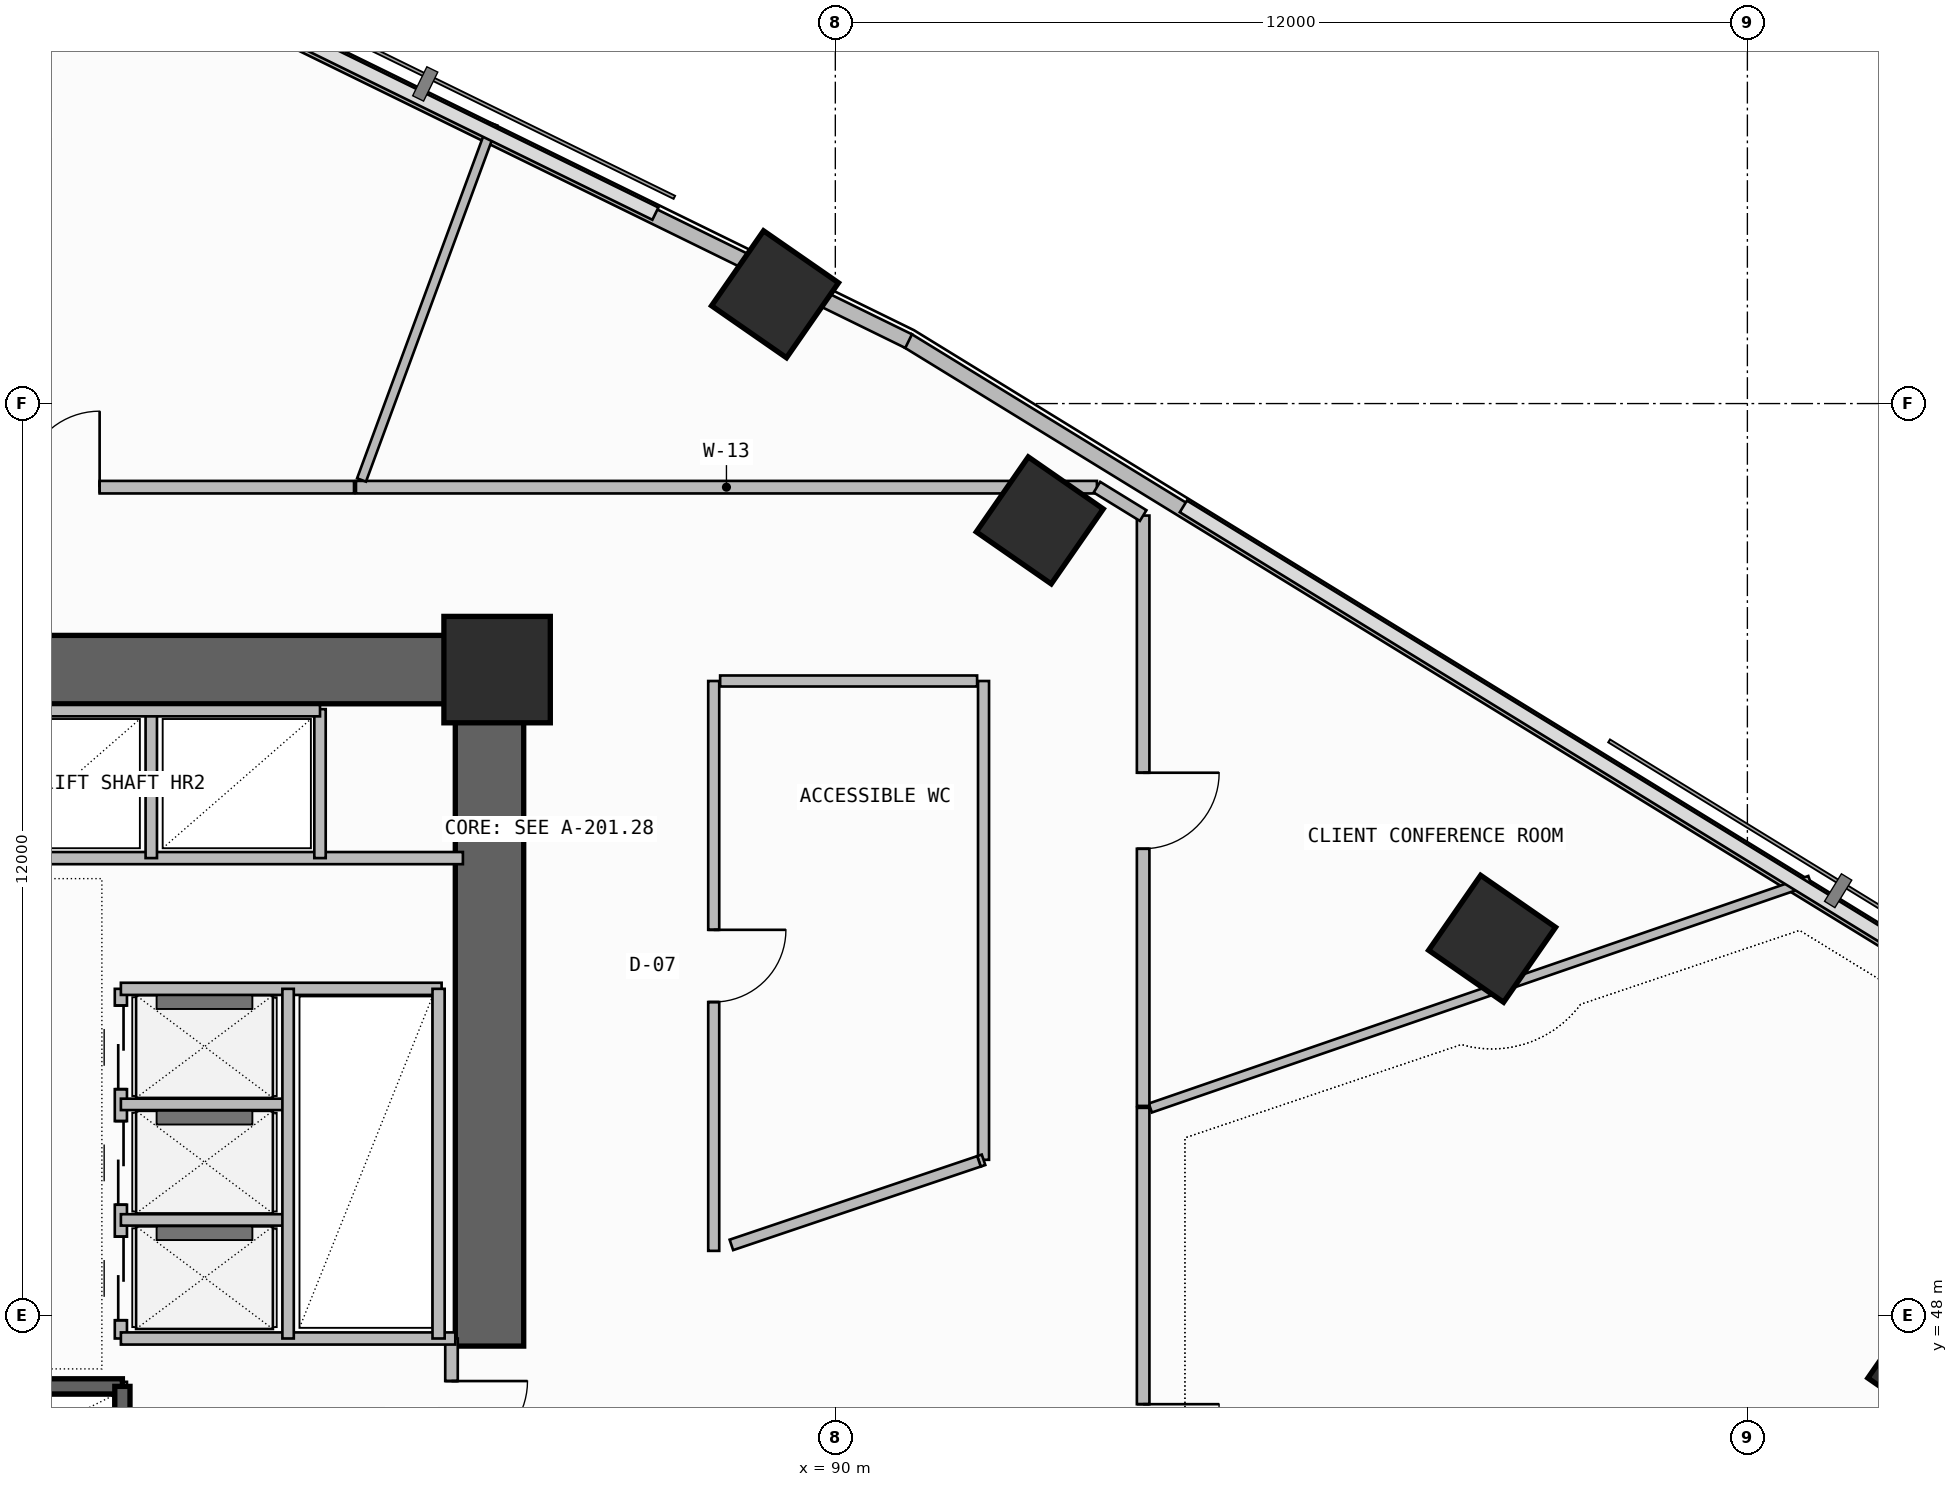
"""IFC4 building model, lengths in metres.
Left out: names, types, materials, properties, quantities, classifications, styles, units other than length and angle.
Written with IfcOpenShell. Run it as: python <this file> out.ifc"""

import sys

from ifc_helpers import new_model, si_unit, direction, frame, frame_2d, origin, origin_2d, place, context, subcontext, project, spatial, rectangle, extrude, element, fill, save


model = new_model("IFC4")
c1 = context("Model", 3, precision=1e-05, world=origin(), true_north=direction((0.0, 1.0)))
c2 = subcontext(c1, "Body", "Model", "MODEL_VIEW")
j1 = project(units=[si_unit("LENGTHUNIT", "METRE"), si_unit("PLANEANGLEUNIT", "RADIAN")], contexts=[c1])
p1 = place(None, origin())
s1 = spatial("IfcSite", under=j1, at=p1, CompositionType="ELEMENT")
p2 = place(p1, origin())
s2 = spatial("IfcBuilding", under=s1, at=p2, CompositionType="ELEMENT")
p3 = place(p2, frame((0.0, 0.0, 99.3)))
s3 = spatial("IfcBuildingStorey", under=s2, at=p3, CompositionType="ELEMENT", Elevation=99.3)
p4 = place(p3, frame((72.0, 56.5, -0.26), z_axis=(0.0, 0.0, 1.0), x_axis=(1.0, 0.0, 0.0)))
e1 = element("IfcWall", 1, at=p4, inside=s3, PredefinedType="SHEAR", context=c2, shape_type="SweptSolid", body=[
    extrude(rectangle(XDim=13.9, YDim=0.9, at=frame_2d((6.95, 0.0))), origin(), (0.0, 0.0, 1.0), 3.6),
])
p5 = place(p3, frame((85.45, 47.6, -0.26), z_axis=(0.0, 0.0, 1.0), x_axis=(0.0, 1.0, 0.0)))
e2 = element("IfcWall", 2, at=p5, inside=s3, PredefinedType="SHEAR", context=c2, shape_type="SweptSolid", body=[
    extrude(rectangle(XDim=8.45, YDim=0.9, at=frame_2d((4.225, 0.0))), origin(), (0.0, 0.0, 1.0), 3.6),
])
p6 = place(p3, frame((85.55, 56.5, 0.0), z_axis=(0.0, 0.0, 1.0), x_axis=(1.0, 0.0, 0.0)))
e3 = element("IfcColumn", 3, at=p6, inside=s3, PredefinedType="COLUMN", context=c2, shape_type="SweptSolid", body=[
    extrude(rectangle(XDim=1.4, YDim=1.4, at=origin_2d()), origin(), (0.0, 0.0, 1.0), 3.6),
])
for number, where, z_axis, x_axis in (
    (4, (104.42, 47.331, 0.0), (0.0, 0.0, 1.0), (0.57, 0.822, 0.0)),
    (5, (98.641, 52.958, 0.0), (0.0, 0.0, 1.0), (0.57, 0.822, 0.0)),
    (6, (92.69, 58.463, 0.0), (0.0, 0.0, 1.0), (0.57, 0.822, 0.0)),
    (7, (89.207, 61.438, 0.0), (0.0, 0.0, 1.0), (0.57, 0.822, 0.0)),
):
    element("IfcColumn", number, at=place(p3, frame(where, z_axis=z_axis, x_axis=x_axis)), inside=s3, PredefinedType="COLUMN", context=c2, shape_type="SweptSolid", body=[
        extrude(rectangle(XDim=1.2, YDim=1.2, at=origin_2d()), origin(), (0.0, 0.0, 1.0), 3.6),
    ])
p7 = place(p3, frame((119.865, 43.07, 0.0), z_axis=(0.0, 0.0, 1.0), x_axis=(-0.852110824326, 0.52336138859, 0.0)))
e8 = element("IfcWall", 8, at=p7, inside=s3, PredefinedType="PARAPET", context=c2, shape_type="SweptSolid", body=[
    extrude(rectangle(XDim=33.932, YDim=0.2, at=frame_2d((16.966, 0.0))), origin(), (0.0, 0.0, 1.0), 1.15),
])
p8 = place(p3, frame((90.964, 60.822, 0.0), z_axis=(0.0, 0.0, 1.0), x_axis=(-0.898000468284, 0.439994498787, 0.0)))
e9 = element("IfcWall", 9, at=p8, inside=s3, PredefinedType="PARAPET", context=c2, shape_type="SweptSolid", body=[
    extrude(rectangle(XDim=1.423, YDim=0.2, at=frame_2d((0.712, 0.0))), origin(), (0.0, 0.0, 1.0), 1.15),
])
p9 = place(p3, frame((88.921, 61.823, 0.0), z_axis=(0.0, 0.0, 1.0), x_axis=(-0.897993533426, 0.440008652103, 0.0)))
e10 = element("IfcWall", 10, at=p9, inside=s3, PredefinedType="PARAPET", context=c2, shape_type="SweptSolid", body=[
    extrude(rectangle(XDim=26.864, YDim=0.2, at=frame_2d((13.432, 0.0))), origin(), (0.0, 0.0, 1.0), 1.15),
])
p10 = place(p3, frame((72.92, 47.07, -0.26), z_axis=(0.0, 0.0, 1.0), x_axis=(1.0, 0.0, 0.0)))
e11 = element("IfcWall", 11, at=p10, inside=s3, PredefinedType="SOLIDWALL", context=c2, shape_type="SweptSolid", body=[
    extrude(rectangle(XDim=7.7, YDim=0.2, at=frame_2d((3.85, 0.0))), origin(), (0.0, 0.0, 1.0), 3.6),
])
p11 = place(p3, frame((80.62, 43.83, -0.26), z_axis=(0.0, 0.0, 1.0), x_axis=(0.0, 1.0, 0.0)))
e12 = element("IfcWall", 12, at=p11, inside=s3, PredefinedType="SOLIDWALL", context=c2, shape_type="SweptSolid", body=[
    extrude(rectangle(XDim=3.24, YDim=0.2, at=frame_2d((1.62, 0.0))), origin(), (0.0, 0.0, 1.0), 3.6),
])
p12 = place(p3, frame((84.95, 45.58, 0.0), z_axis=(0.0, 0.0, 1.0), x_axis=(0.0, 1.0, 0.0)))
e13 = element("IfcWall", 13, at=p12, inside=s3, PredefinedType="PARTITIONING", context=c2, shape_type="SweptSolid", body=[
    extrude(rectangle(XDim=2.12, YDim=0.165, at=frame_2d((1.06, 0.0))), origin(), (0.0, 0.0, 1.0), 3.34),
])
p13 = place(p12, frame((0.56, 0.0, 0.0)))
e14 = element("IfcOpeningElement", 14, at=p13, cuts=e13, PredefinedType="OPENING", context=c2, shape_type="SweptSolid", body=[
    extrude(rectangle(XDim=1.0, YDim=2.2, at=frame_2d((0.5, 1.1))), frame((0.0, 0.093, 0.0), z_axis=(0.0, -1.0, 0.0), x_axis=(1.0, 0.0, 0.0)), (0.0, 0.0, 1.0), 0.185),
])
p14 = place(p3, frame((80.6, 47.7, 0.0), z_axis=(0.0, 0.0, 1.0), x_axis=(0.0, 1.0, 0.0)))
e15 = element("IfcWall", 15, at=p14, inside=s3, PredefinedType="SOLIDWALL", context=c2, shape_type="SweptSolid", body=[
    extrude(rectangle(XDim=4.6, YDim=0.16, at=frame_2d((2.3, 0.0))), origin(), (0.0, 0.0, 1.0), 3.34),
])
p15 = place(p14, frame((0.24, 0.0, 0.0)))
e16 = element("IfcOpeningElement", 16, at=p15, cuts=e15, PredefinedType="OPENING", context=c2, shape_type="SweptSolid", body=[
    extrude(rectangle(XDim=1.1, YDim=2.25, at=frame_2d((0.55, 1.125))), frame((0.0, 0.09, 0.0), z_axis=(0.0, -1.0, 0.0), x_axis=(1.0, 0.0, 0.0)), (0.0, 0.0, 1.0), 0.18),
])
p16 = place(p14, frame((1.76, 0.0, 0.0)))
e17 = element("IfcOpeningElement", 17, at=p16, cuts=e15, PredefinedType="OPENING", context=c2, shape_type="SweptSolid", body=[
    extrude(rectangle(XDim=1.1, YDim=2.25, at=frame_2d((0.55, 1.125))), frame((0.0, 0.09, 0.0), z_axis=(0.0, -1.0, 0.0), x_axis=(1.0, 0.0, 0.0)), (0.0, 0.0, 1.0), 0.18),
])
p17 = place(p14, frame((3.28, 0.0, 0.0)))
e18 = element("IfcOpeningElement", 18, at=p17, cuts=e15, PredefinedType="OPENING", context=c2, shape_type="SweptSolid", body=[
    extrude(rectangle(XDim=1.1, YDim=2.25, at=frame_2d((0.55, 1.125))), frame((0.0, 0.09, 0.0), z_axis=(0.0, -1.0, 0.0), x_axis=(1.0, 0.0, 0.0)), (0.0, 0.0, 1.0), 0.18),
])
p18 = place(p3, frame((80.6, 47.7, 0.0), z_axis=(0.0, 0.0, 1.0), x_axis=(1.0, 0.0, 0.0)))
e19 = element("IfcWall", 19, at=p18, inside=s3, PredefinedType="SOLIDWALL", context=c2, shape_type="SweptSolid", body=[
    extrude(rectangle(XDim=4.4, YDim=0.16, at=frame_2d((2.2, 0.0))), origin(), (0.0, 0.0, 1.0), 3.34),
])
p19 = place(p3, frame((80.6, 52.3, 0.0), z_axis=(0.0, 0.0, 1.0), x_axis=(1.0, 0.0, 0.0)))
e20 = element("IfcWall", 20, at=p19, inside=s3, PredefinedType="SOLIDWALL", context=c2, shape_type="SweptSolid", body=[
    extrude(rectangle(XDim=4.22, YDim=0.16, at=frame_2d((2.11, 0.0))), origin(), (0.0, 0.0, 1.0), 3.34),
])
for number, where, z_axis, x_axis in (
    (21, (80.6, 49.26, 0.0), (0.0, 0.0, 1.0), (1.0, 0.0, 0.0)),
    (22, (80.6, 50.78, 0.0), (0.0, 0.0, 1.0), (1.0, 0.0, 0.0)),
):
    element("IfcWall", number, at=place(p3, frame(where, z_axis=z_axis, x_axis=x_axis)), inside=s3, PredefinedType="PLUMBINGWALL", context=c2, shape_type="SweptSolid", body=[
        extrude(rectangle(XDim=2.2, YDim=0.15, at=frame_2d((1.1, 0.0))), origin(), (0.0, 0.0, 1.0), 3.34),
    ])
p20 = place(p3, frame((82.8, 47.7, 0.0), z_axis=(0.0, 0.0, 1.0), x_axis=(0.0, 1.0, 0.0)))
e23 = element("IfcWall", 23, at=p20, inside=s3, PredefinedType="PLUMBINGWALL", context=c2, shape_type="SweptSolid", body=[
    extrude(rectangle(XDim=4.6, YDim=0.15, at=frame_2d((2.3, 0.0))), origin(), (0.0, 0.0, 1.0), 3.34),
])
p21 = place(p3, frame((84.78, 47.7, 0.0), z_axis=(0.0, 0.0, 1.0), x_axis=(0.0, 1.0, 0.0)))
e24 = element("IfcWall", 24, at=p21, inside=s3, PredefinedType="SOLIDWALL", context=c2, shape_type="SweptSolid", body=[
    extrude(rectangle(XDim=4.6, YDim=0.16, at=frame_2d((2.3, 0.0))), origin(), (0.0, 0.0, 1.0), 3.34),
])
p22 = place(p3, frame((73.02, 54.02, 0.0), z_axis=(0.0, 0.0, 1.0), x_axis=(1.0, 0.0, 0.0)))
e25 = element("IfcWall", 25, at=p22, inside=s3, PredefinedType="SOLIDWALL", context=c2, shape_type="SweptSolid", body=[
    extrude(rectangle(XDim=12.08, YDim=0.16, at=frame_2d((6.04, 0.0))), origin(), (0.0, 0.0, 1.0), 3.34),
])
p23 = place(p3, frame((81.0, 54.02, 0.0), z_axis=(0.0, 0.0, 1.0), x_axis=(0.0, 1.0, 0.0)))
e26 = element("IfcWall", 26, at=p23, inside=s3, PredefinedType="PLUMBINGWALL", context=c2, shape_type="SweptSolid", body=[
    extrude(rectangle(XDim=1.96, YDim=0.15, at=frame_2d((0.98, 0.0))), origin(), (0.0, 0.0, 1.0), 3.34),
])
p24 = place(p3, frame((83.22, 54.02, 0.0), z_axis=(0.0, 0.0, 1.0), x_axis=(0.0, 1.0, 0.0)))
e27 = element("IfcWall", 27, at=p24, inside=s3, PredefinedType="SOLIDWALL", context=c2, shape_type="SweptSolid", body=[
    extrude(rectangle(XDim=1.96, YDim=0.15, at=frame_2d((0.98, 0.0))), origin(), (0.0, 0.0, 1.0), 3.34),
])
p25 = place(p3, frame((76.52, 55.96, 0.0), z_axis=(0.0, 0.0, 1.0), x_axis=(1.0, 0.0, 0.0)))
e28 = element("IfcWall", 28, at=p25, inside=s3, PredefinedType="SOLIDWALL", context=c2, shape_type="SweptSolid", body=[
    extrude(rectangle(XDim=6.7, YDim=0.15, at=frame_2d((3.35, 0.0))), origin(), (0.0, 0.0, 1.0), 3.34),
])
p26 = place(p3, frame((94.05, 41.937, 0.0), z_axis=(0.0, 0.0, 1.0), x_axis=(0.0, 1.0, 0.0)))
e29 = element("IfcWall", 29, at=p26, inside=s3, PredefinedType="PARTITIONING", context=c2, shape_type="SweptSolid", body=[
    extrude(rectangle(XDim=8.797, YDim=0.165, at=frame_2d((4.399, 0.0))), origin(), (0.0, 0.0, 1.0), 2.725),
])
p27 = place(p26, frame((3.899, 0.0, 0.0)))
e30 = element("IfcOpeningElement", 30, at=p27, cuts=e29, PredefinedType="OPENING", context=c2, shape_type="SweptSolid", body=[
    extrude(rectangle(XDim=1.0, YDim=2.2, at=frame_2d((0.5, 1.1))), frame((0.0, 0.093, 0.0), z_axis=(0.0, -1.0, 0.0), x_axis=(1.0, 0.0, 0.0)), (0.0, 0.0, 1.0), 0.185),
])
p28 = place(p3, frame((94.145, 50.732, 0.0), z_axis=(0.0, 0.0, 1.0), x_axis=(0.945341886098, 0.326080846399, 0.0)))
e31 = element("IfcWall", 31, at=p28, inside=s3, PredefinedType="PARTITIONING", context=c2, shape_type="SweptSolid", body=[
    extrude(rectangle(XDim=9.179, YDim=0.125, at=frame_2d((4.59, 0.0))), origin(), (0.0, 0.0, 1.0), 2.725),
])
p29 = place(p3, frame((88.4, 48.853, 0.0), z_axis=(0.0, 0.0, 1.0), x_axis=(0.0, 1.0, 0.0)))
e32 = element("IfcWall", 32, at=p29, inside=s3, PredefinedType="PARTITIONING", context=c2, shape_type="SweptSolid", body=[
    extrude(rectangle(XDim=7.497, YDim=0.145, at=frame_2d((3.749, 0.0))), origin(), (0.0, 0.0, 1.0), 2.725),
])
p30 = place(p29, frame((3.274, 0.0, 0.0)))
e33 = element("IfcOpeningElement", 33, at=p30, cuts=e32, PredefinedType="OPENING", context=c2, shape_type="SweptSolid", body=[
    extrude(rectangle(XDim=0.95, YDim=2.15, at=frame_2d((0.475, 1.075))), frame((0.0, 0.083, 0.0), z_axis=(0.0, -1.0, 0.0), x_axis=(1.0, 0.0, 0.0)), (0.0, 0.0, 1.0), 0.165),
])
p31 = place(p3, frame((91.95, 56.35, 0.0), z_axis=(0.0, 0.0, 1.0), x_axis=(0.0, -1.0, 0.0)))
e34 = element("IfcWall", 34, at=p31, inside=s3, PredefinedType="PARTITIONING", context=c2, shape_type="SweptSolid", body=[
    extrude(rectangle(XDim=6.299, YDim=0.145, at=frame_2d((3.15, 0.0))), origin(), (0.0, 0.0, 1.0), 2.725),
])
p32 = place(p3, frame((88.485, 56.35, 0.0), z_axis=(0.0, 0.0, 1.0), x_axis=(1.0, 0.0, 0.0)))
e35 = element("IfcWall", 35, at=p32, inside=s3, PredefinedType="PARTITIONING", context=c2, shape_type="SweptSolid", body=[
    extrude(rectangle(XDim=3.381, YDim=0.145, at=frame_2d((1.69, 0.0))), origin(), (0.0, 0.0, 1.0), 2.875),
])
p33 = place(p3, frame((91.95, 50.051, 0.0), z_axis=(0.0, 0.0, 1.0), x_axis=(-0.948683298051, -0.316227766017, 0.0)))
e36 = element("IfcWall", 36, at=p33, inside=s3, PredefinedType="PARTITIONING", context=c2, shape_type="SweptSolid", body=[
    extrude(rectangle(XDim=0.063, YDim=0.145, at=frame_2d((0.032, 0.0))), origin(), (0.0, 0.0, 1.0), 3.34),
])
p34 = place(p3, frame((93.442, 58.9, 0.0), z_axis=(0.0, 0.0, 1.0), x_axis=(-1.0, 0.0, 0.0)))
e37 = element("IfcWall", 37, at=p34, inside=s3, PredefinedType="PARTITIONING", context=c2, shape_type="SweptSolid", body=[
    extrude(rectangle(XDim=9.749, YDim=0.165, at=frame_2d((4.875, 0.0))), origin(), (0.0, 0.0, 1.0), 2.725),
])
p35 = place(p3, frame((94.05, 50.76, 0.0), z_axis=(0.0, 0.0, 1.0), x_axis=(0.0, 1.0, 0.0)))
e38 = element("IfcWall", 38, at=p35, inside=s3, PredefinedType="PARTITIONING", context=c2, shape_type="SweptSolid", body=[
    extrude(rectangle(XDim=7.767, YDim=0.165, at=frame_2d((3.883, 0.0))), origin(), (0.0, 0.0, 1.0), 2.725),
])
p36 = place(p35, frame((3.383, 0.0, 0.0)))
e39 = element("IfcOpeningElement", 39, at=p36, cuts=e38, PredefinedType="OPENING", context=c2, shape_type="SweptSolid", body=[
    extrude(rectangle(XDim=1.0, YDim=2.2, at=frame_2d((0.5, 1.1))), frame((0.0, 0.093, 0.0), z_axis=(0.0, -1.0, 0.0), x_axis=(1.0, 0.0, 0.0)), (0.0, 0.0, 1.0), 0.185),
])
p37 = place(p3, frame((94.05, 58.527, 0.0), z_axis=(0.0, 0.0, 1.0), x_axis=(-0.852256862618, 0.523123541928, 0.0)))
e40 = element("IfcWall", 40, at=p37, inside=s3, PredefinedType="PARTITIONING", context=c2, shape_type="SweptSolid", body=[
    extrude(rectangle(XDim=0.714, YDim=0.165, at=frame_2d((0.357, 0.0))), origin(), (0.0, 0.0, 1.0), 3.34),
])
p38 = place(p3, frame((83.766, 58.994, 0.0), z_axis=(0.0, 0.0, 1.0), x_axis=(0.345974939757, 0.938243753542, 0.0)))
e41 = element("IfcWall", 41, at=p38, inside=s3, PredefinedType="PARTITIONING", context=c2, shape_type="SweptSolid", body=[
    extrude(rectangle(XDim=4.994, YDim=0.125, at=frame_2d((2.497, 0.0))), origin(), (0.0, 0.0, 1.0), 3.34),
])
p39 = place(p3, frame((83.667, 58.9, 0.0), z_axis=(0.0, 0.0, 1.0), x_axis=(-1.0, 0.0, 0.0)))
e42 = element("IfcWall", 42, at=p39, inside=s3, PredefinedType="PARTITIONING", context=c2, shape_type="SweptSolid", body=[
    extrude(rectangle(XDim=7.694, YDim=0.165, at=frame_2d((3.847, 0.0))), origin(), (0.0, 0.0, 1.0), 3.34),
])
p40 = place(p39, frame((3.347, 0.0, 0.0)))
e43 = element("IfcOpeningElement", 43, at=p40, cuts=e42, PredefinedType="OPENING", context=c2, shape_type="SweptSolid", body=[
    extrude(rectangle(XDim=1.0, YDim=2.2, at=frame_2d((0.5, 1.1))), frame((0.0, 0.093, 0.0), z_axis=(0.0, -1.0, 0.0), x_axis=(1.0, 0.0, 0.0)), (0.0, 0.0, 1.0), 0.185),
])
p41 = place(p3, frame((91.89, 50.031, 0.0), z_axis=(0.0, 0.0, 1.0), x_axis=(-0.947469146396, -0.319847176988, 0.0)))
e44 = element("IfcWall", 44, at=p41, inside=s3, PredefinedType="PARTITIONING", context=c2, shape_type="SweptSolid", body=[
    extrude(rectangle(XDim=3.438, YDim=0.145, at=frame_2d((1.719, 0.0))), origin(), (0.0, 0.0, 1.0), 3.34),
])
p42 = place(p13, frame((1.0, 0.0, 0.0), z_axis=(0.0, 0.0, 1.0), x_axis=(-1.0, 0.0, 0.0)))
e45 = element("IfcDoor", 45, at=p42, inside=s3, OperationType="SINGLE_SWING_LEFT", PredefinedType="DOOR", context=c2, shape_type="SweptSolid", body=[
    extrude(rectangle(XDim=1.0, YDim=2.2, at=frame_2d((0.5, 1.1))), frame((0.0, 0.025, 0.0), z_axis=(0.0, -1.0, 0.0), x_axis=(1.0, 0.0, 0.0)), (0.0, 0.0, 1.0), 0.05),
])
fill(e14, e45)
p43 = place(p15, frame((1.1, 0.0, 0.0), z_axis=(0.0, 0.0, 1.0), x_axis=(-1.0, 0.0, 0.0)))
e46 = element("IfcDoor", 46, at=p43, inside=s3, OperationType="DOUBLE_DOOR_SLIDING", PredefinedType="DOOR", context=c2, shape_type="SweptSolid", body=[
    extrude(rectangle(XDim=1.1, YDim=2.25, at=frame_2d((0.55, 1.125))), frame((0.0, 0.025, 0.0), z_axis=(0.0, -1.0, 0.0), x_axis=(1.0, 0.0, 0.0)), (0.0, 0.0, 1.0), 0.05),
])
fill(e16, e46)
p44 = place(p16, frame((1.1, 0.0, 0.0), z_axis=(0.0, 0.0, 1.0), x_axis=(-1.0, 0.0, 0.0)))
e47 = element("IfcDoor", 47, at=p44, inside=s3, OperationType="DOUBLE_DOOR_SLIDING", PredefinedType="DOOR", context=c2, shape_type="SweptSolid", body=[
    extrude(rectangle(XDim=1.1, YDim=2.25, at=frame_2d((0.55, 1.125))), frame((0.0, 0.025, 0.0), z_axis=(0.0, -1.0, 0.0), x_axis=(1.0, 0.0, 0.0)), (0.0, 0.0, 1.0), 0.05),
])
fill(e17, e47)
p45 = place(p17, frame((1.1, 0.0, 0.0), z_axis=(0.0, 0.0, 1.0), x_axis=(-1.0, 0.0, 0.0)))
e48 = element("IfcDoor", 48, at=p45, inside=s3, OperationType="DOUBLE_DOOR_SLIDING", PredefinedType="DOOR", context=c2, shape_type="SweptSolid", body=[
    extrude(rectangle(XDim=1.1, YDim=2.25, at=frame_2d((0.55, 1.125))), frame((0.0, 0.025, 0.0), z_axis=(0.0, -1.0, 0.0), x_axis=(1.0, 0.0, 0.0)), (0.0, 0.0, 1.0), 0.05),
])
fill(e18, e48)
p46 = place(p27, frame((1.0, 0.0, 0.0), z_axis=(0.0, 0.0, 1.0), x_axis=(-1.0, 0.0, 0.0)))
e49 = element("IfcDoor", 49, at=p46, inside=s3, OperationType="SINGLE_SWING_LEFT", PredefinedType="DOOR", context=c2, shape_type="SweptSolid", body=[
    extrude(rectangle(XDim=1.0, YDim=2.2, at=frame_2d((0.5, 1.1))), frame((0.0, 0.025, 0.0), z_axis=(0.0, -1.0, 0.0), x_axis=(1.0, 0.0, 0.0)), (0.0, 0.0, 1.0), 0.05),
])
fill(e30, e49)
p47 = place(p30, frame((0.95, 0.0, 0.0), z_axis=(0.0, 0.0, 1.0), x_axis=(-1.0, 0.0, 0.0)))
e50 = element("IfcDoor", 50, at=p47, inside=s3, OperationType="SINGLE_SWING_LEFT", PredefinedType="DOOR", context=c2, shape_type="SweptSolid", body=[
    extrude(rectangle(XDim=0.95, YDim=2.15, at=frame_2d((0.475, 1.075))), frame((0.0, 0.025, 0.0), z_axis=(0.0, -1.0, 0.0), x_axis=(1.0, 0.0, 0.0)), (0.0, 0.0, 1.0), 0.05),
])
fill(e33, e50)
p48 = place(p36, frame((1.0, 0.0, 0.0), z_axis=(0.0, 0.0, 1.0), x_axis=(-1.0, 0.0, 0.0)))
e51 = element("IfcDoor", 51, at=p48, inside=s3, OperationType="SINGLE_SWING_LEFT", PredefinedType="DOOR", context=c2, shape_type="SweptSolid", body=[
    extrude(rectangle(XDim=1.0, YDim=2.2, at=frame_2d((0.5, 1.1))), frame((0.0, 0.025, 0.0), z_axis=(0.0, -1.0, 0.0), x_axis=(1.0, 0.0, 0.0)), (0.0, 0.0, 1.0), 0.05),
])
fill(e39, e51)
p49 = place(p40, frame((1.0, 0.0, 0.0), z_axis=(0.0, 0.0, 1.0), x_axis=(-1.0, 0.0, 0.0)))
e52 = element("IfcDoor", 52, at=p49, inside=s3, OperationType="SINGLE_SWING_RIGHT", PredefinedType="DOOR", context=c2, shape_type="SweptSolid", body=[
    extrude(rectangle(XDim=1.0, YDim=2.2, at=frame_2d((0.5, 1.1))), frame((0.0, 0.025, 0.0), z_axis=(0.0, -1.0, 0.0), x_axis=(1.0, 0.0, 0.0)), (0.0, 0.0, 1.0), 0.05),
])
fill(e43, e52)
save(model, sys.argv[1])
